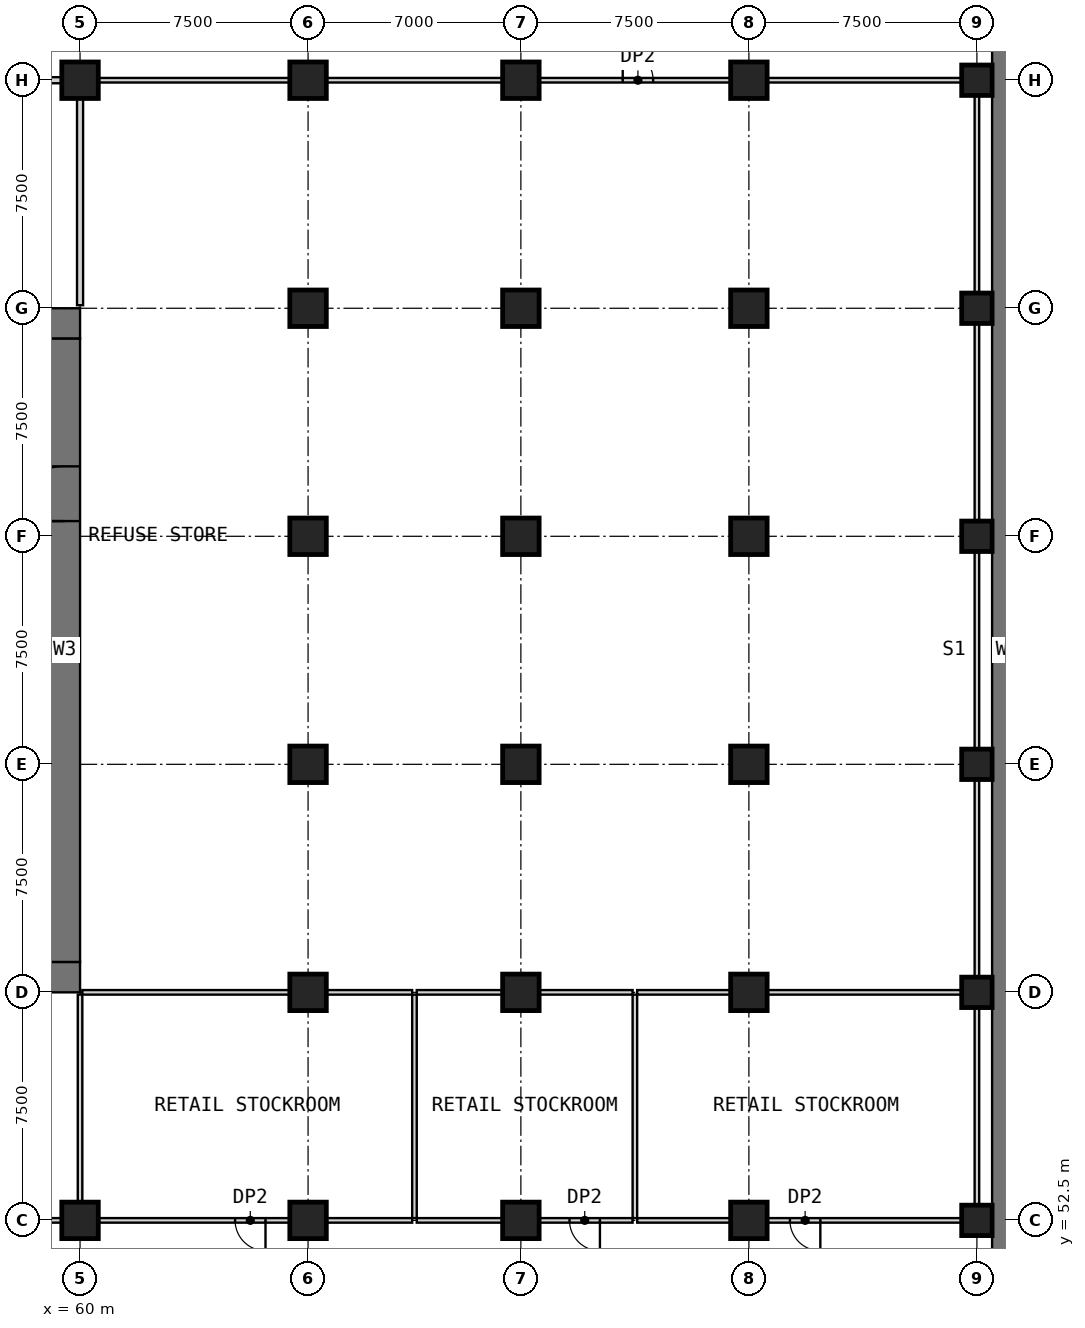
"""IFC4 building model, lengths in metres.
Left out: names, types, materials, properties, quantities, classifications, styles, units other than length and angle.
Written with IfcOpenShell. Run it as: python <this file> out.ifc"""

import sys

from ifc_helpers import new_model, si_unit, direction, frame, frame_2d, origin, origin_2d, place, context, subcontext, project, spatial, rectangle, extrude, element, fill, save


model = new_model("IFC4")
c1 = context("Model", 3, precision=1e-05, world=origin(), true_north=direction((0.0, 1.0)))
c2 = subcontext(c1, "Body", "Model", "MODEL_VIEW")
j1 = project(units=[si_unit("LENGTHUNIT", "METRE"), si_unit("PLANEANGLEUNIT", "RADIAN")], contexts=[c1])
p1 = place(None, origin())
s1 = spatial("IfcSite", under=j1, at=p1, CompositionType="ELEMENT")
p2 = place(p1, origin())
s2 = spatial("IfcBuilding", under=s1, at=p2, CompositionType="ELEMENT")
p3 = place(p2, frame((0.0, 0.0, -6.0)))
s3 = spatial("IfcBuildingStorey", under=s2, at=p3, CompositionType="ELEMENT", Elevation=-6.0)
p4 = place(p3, frame((90.5, 25.0, 0.0), z_axis=(0.0, 0.0, 1.0), x_axis=(0.0, 1.0, 0.0)))
e1 = element("IfcWall", 1, at=p4, inside=s3, PredefinedType="SHEAR", context=c2, shape_type="SweptSolid", body=[
    extrude(rectangle(XDim=92.5, YDim=1.0, at=frame_2d((46.25, 0.0))), origin(), (0.0, 0.0, 1.0), 4.8),
])
p5 = place(p4, frame((23.15, 0.0, 0.0)))
e2 = element("IfcOpeningElement", 2, at=p5, cuts=e1, PredefinedType="OPENING", context=c2, shape_type="SweptSolid", body=[
    extrude(rectangle(XDim=1.5, YDim=2.1, at=frame_2d((0.75, 1.05))), frame((0.0, 0.51, 0.0), z_axis=(0.0, -1.0, 0.0), x_axis=(1.0, 0.0, 0.0)), (0.0, 0.0, 1.0), 1.02),
])
p6 = place(p4, frame((67.75, 0.0, 0.0)))
e3 = element("IfcOpeningElement", 3, at=p6, cuts=e1, PredefinedType="OPENING", context=c2, shape_type="SweptSolid", body=[
    extrude(rectangle(XDim=1.5, YDim=2.1, at=frame_2d((0.75, 1.05))), frame((0.0, 0.51, 0.0), z_axis=(0.0, -1.0, 0.0), x_axis=(1.0, 0.0, 0.0)), (0.0, 0.0, 1.0), 1.02),
])
for number, where, z_axis, x_axis in (
    (4, (60.0, 52.5, 0.0), (0.0, 0.0, 1.0), (1.0, 0.0, 0.0)),
    (5, (60.0, 90.0, 0.0), (0.0, 0.0, 1.0), (1.0, 0.0, 0.0)),
    (6, (67.5, 52.5, 0.0), (0.0, 0.0, 1.0), (1.0, 0.0, 0.0)),
    (7, (67.5, 60.0, 0.0), (0.0, 0.0, 1.0), (1.0, 0.0, 0.0)),
    (8, (67.5, 67.5, 0.0), (0.0, 0.0, 1.0), (1.0, 0.0, 0.0)),
    (9, (67.5, 75.0, 0.0), (0.0, 0.0, 1.0), (1.0, 0.0, 0.0)),
    (10, (67.5, 82.5, 0.0), (0.0, 0.0, 1.0), (1.0, 0.0, 0.0)),
    (11, (67.5, 90.0, 0.0), (0.0, 0.0, 1.0), (1.0, 0.0, 0.0)),
    (12, (74.5, 52.5, 0.0), (0.0, 0.0, 1.0), (1.0, 0.0, 0.0)),
    (13, (74.5, 60.0, 0.0), (0.0, 0.0, 1.0), (1.0, 0.0, 0.0)),
    (14, (74.5, 67.5, 0.0), (0.0, 0.0, 1.0), (1.0, 0.0, 0.0)),
    (15, (74.5, 75.0, 0.0), (0.0, 0.0, 1.0), (1.0, 0.0, 0.0)),
    (16, (74.5, 82.5, 0.0), (0.0, 0.0, 1.0), (1.0, 0.0, 0.0)),
    (17, (74.5, 90.0, 0.0), (0.0, 0.0, 1.0), (1.0, 0.0, 0.0)),
    (18, (82.0, 52.5, 0.0), (0.0, 0.0, 1.0), (1.0, 0.0, 0.0)),
    (19, (82.0, 60.0, 0.0), (0.0, 0.0, 1.0), (1.0, 0.0, 0.0)),
    (20, (82.0, 67.5, 0.0), (0.0, 0.0, 1.0), (1.0, 0.0, 0.0)),
    (21, (82.0, 75.0, 0.0), (0.0, 0.0, 1.0), (1.0, 0.0, 0.0)),
    (22, (82.0, 82.5, 0.0), (0.0, 0.0, 1.0), (1.0, 0.0, 0.0)),
    (23, (82.0, 90.0, 0.0), (0.0, 0.0, 1.0), (1.0, 0.0, 0.0)),
):
    element("IfcColumn", number, at=place(p3, frame(where, z_axis=z_axis, x_axis=x_axis)), inside=s3, PredefinedType="COLUMN", context=c2, shape_type="SweptSolid", body=[
        extrude(rectangle(XDim=1.2, YDim=1.2, at=origin_2d()), origin(), (0.0, 0.0, 1.0), 6.0),
    ])
for number, where, z_axis, x_axis in (
    (24, (89.5, 52.5, 0.0), (0.0, 0.0, 1.0), (1.0, 0.0, 0.0)),
    (25, (89.5, 60.0, 0.0), (0.0, 0.0, 1.0), (1.0, 0.0, 0.0)),
    (26, (89.5, 67.5, 0.0), (0.0, 0.0, 1.0), (1.0, 0.0, 0.0)),
    (27, (89.5, 75.0, 0.0), (0.0, 0.0, 1.0), (1.0, 0.0, 0.0)),
    (28, (89.5, 82.5, 0.0), (0.0, 0.0, 1.0), (1.0, 0.0, 0.0)),
    (29, (89.5, 90.0, 0.0), (0.0, 0.0, 1.0), (1.0, 0.0, 0.0)),
):
    element("IfcColumn", number, at=place(p3, frame(where, z_axis=z_axis, x_axis=x_axis)), inside=s3, PredefinedType="COLUMN", context=c2, shape_type="SweptSolid", body=[
        extrude(rectangle(XDim=1.0, YDim=1.0, at=origin_2d()), origin(), (0.0, 0.0, 1.0), 6.0),
    ])
p7 = place(p3, frame((30.0, 60.5, 0.0), z_axis=(0.0, 0.0, 1.0), x_axis=(1.0, 0.0, 0.0)))
e30 = element("IfcWall", 30, at=p7, inside=s3, PredefinedType="SHEAR", context=c2, shape_type="SweptSolid", body=[
    extrude(rectangle(XDim=30.0, YDim=1.0, at=frame_2d((15.0, 0.0))), origin(), (0.0, 0.0, 1.0), 6.0),
])
p8 = place(p7, frame((21.9, 0.0, 0.0)))
e31 = element("IfcOpeningElement", 31, at=p8, cuts=e30, PredefinedType="OPENING", context=c2, shape_type="SweptSolid", body=[
    extrude(rectangle(XDim=1.8, YDim=2.1, at=frame_2d((0.9, 1.05))), frame((0.0, 0.51, 0.0), z_axis=(0.0, -1.0, 0.0), x_axis=(1.0, 0.0, 0.0)), (0.0, 0.0, 1.0), 1.02),
])
p9 = place(p7, frame((26.5, 0.0, 0.0)))
e32 = element("IfcOpeningElement", 32, at=p9, cuts=e30, PredefinedType="OPENING", context=c2, shape_type="SweptSolid", body=[
    extrude(rectangle(XDim=1.2, YDim=2.1, at=frame_2d((0.6, 1.05))), frame((0.0, 0.51, 0.0), z_axis=(0.0, -1.0, 0.0), x_axis=(1.0, 0.0, 0.0)), (0.0, 0.0, 1.0), 1.02),
])
p10 = place(p3, frame((30.0, 82.0, 0.0), z_axis=(0.0, 0.0, 1.0), x_axis=(1.0, 0.0, 0.0)))
e33 = element("IfcWall", 33, at=p10, inside=s3, PredefinedType="SHEAR", context=c2, shape_type="SweptSolid", body=[
    extrude(rectangle(XDim=30.0, YDim=1.0, at=frame_2d((15.0, 0.0))), origin(), (0.0, 0.0, 1.0), 6.0),
])
p11 = place(p3, frame((59.5, 61.0, 0.0), z_axis=(0.0, 0.0, 1.0), x_axis=(0.0, 1.0, 0.0)))
e34 = element("IfcWall", 34, at=p11, inside=s3, PredefinedType="SHEAR", context=c2, shape_type="SweptSolid", body=[
    extrude(rectangle(XDim=20.5, YDim=1.0, at=frame_2d((10.25, 0.0))), origin(), (0.0, 0.0, 1.0), 6.0),
])
p12 = place(p11, frame((14.5, 0.0, 0.0)))
e35 = element("IfcOpeningElement", 35, at=p12, cuts=e34, PredefinedType="OPENING", context=c2, shape_type="SweptSolid", body=[
    extrude(rectangle(XDim=1.8, YDim=2.1, at=frame_2d((0.9, 1.05))), frame((0.0, 0.51, 0.0), z_axis=(0.0, -1.0, 0.0), x_axis=(1.0, 0.0, 0.0)), (0.0, 0.0, 1.0), 1.02),
])
p13 = place(p3, frame((59.4, 52.5, 0.0), z_axis=(0.0, 0.0, 1.0), x_axis=(-1.0, 0.0, 0.0)))
e36 = element("IfcWall", 36, at=p13, inside=s3, PredefinedType="PARTITIONING", context=c2, shape_type="SweptSolid", body=[
    extrude(rectangle(XDim=6.3, YDim=0.15, at=frame_2d((3.15, 0.0))), origin(), (0.0, 0.0, 1.0), 5.7),
])
p14 = place(p13, frame((4.55, 0.0, 0.0)))
e37 = element("IfcOpeningElement", 37, at=p14, cuts=e36, PredefinedType="OPENING", context=c2, shape_type="SweptSolid", body=[
    extrude(rectangle(XDim=1.0, YDim=2.1, at=frame_2d((0.5, 1.05))), frame((0.0, 0.085, 0.0), z_axis=(0.0, -1.0, 0.0), x_axis=(1.0, 0.0, 0.0)), (0.0, 0.0, 1.0), 0.17),
])
p15 = place(p3, frame((66.9, 52.5, 0.0), z_axis=(0.0, 0.0, 1.0), x_axis=(-1.0, 0.0, 0.0)))
e38 = element("IfcWall", 38, at=p15, inside=s3, PredefinedType="PARTITIONING", context=c2, shape_type="SweptSolid", body=[
    extrude(rectangle(XDim=6.3, YDim=0.15, at=frame_2d((3.15, 0.0))), origin(), (0.0, 0.0, 1.0), 5.7),
])
p16 = place(p15, frame((0.8, 0.0, 0.0)))
e39 = element("IfcOpeningElement", 39, at=p16, cuts=e38, PredefinedType="OPENING", context=c2, shape_type="SweptSolid", body=[
    extrude(rectangle(XDim=1.0, YDim=2.1, at=frame_2d((0.5, 1.05))), frame((0.0, 0.085, 0.0), z_axis=(0.0, -1.0, 0.0), x_axis=(1.0, 0.0, 0.0)), (0.0, 0.0, 1.0), 0.17),
])
for number, where, z_axis, x_axis in (
    (40, (68.1, 52.5, 0.0), (0.0, 0.0, 1.0), (1.0, 0.0, 0.0)),
    (41, (71.075, 52.5, 0.0), (0.0, 0.0, 1.0), (1.0, 0.0, 0.0)),
):
    element("IfcWall", number, at=place(p3, frame(where, z_axis=z_axis, x_axis=x_axis)), inside=s3, PredefinedType="PARTITIONING", context=c2, shape_type="SweptSolid", body=[
        extrude(rectangle(XDim=2.825, YDim=0.15, at=frame_2d((1.413, 0.0))), origin(), (0.0, 0.0, 1.0), 5.7),
    ])
p17 = place(p3, frame((78.175, 52.5, 0.0), z_axis=(0.0, 0.0, 1.0), x_axis=(-1.0, 0.0, 0.0)))
e42 = element("IfcWall", 42, at=p17, inside=s3, PredefinedType="PARTITIONING", context=c2, shape_type="SweptSolid", body=[
    extrude(rectangle(XDim=3.075, YDim=0.15, at=frame_2d((1.538, 0.0))), origin(), (0.0, 0.0, 1.0), 5.7),
])
p18 = place(p17, frame((1.075, 0.0, 0.0)))
e43 = element("IfcOpeningElement", 43, at=p18, cuts=e42, PredefinedType="OPENING", context=c2, shape_type="SweptSolid", body=[
    extrude(rectangle(XDim=1.0, YDim=2.1, at=frame_2d((0.5, 1.05))), frame((0.0, 0.085, 0.0), z_axis=(0.0, -1.0, 0.0), x_axis=(1.0, 0.0, 0.0)), (0.0, 0.0, 1.0), 0.17),
])
p19 = place(p3, frame((78.325, 52.5, 0.0), z_axis=(0.0, 0.0, 1.0), x_axis=(1.0, 0.0, 0.0)))
e44 = element("IfcWall", 44, at=p19, inside=s3, PredefinedType="PARTITIONING", context=c2, shape_type="SweptSolid", body=[
    extrude(rectangle(XDim=3.075, YDim=0.15, at=frame_2d((1.538, 0.0))), origin(), (0.0, 0.0, 1.0), 5.7),
])
p20 = place(p3, frame((89.0, 52.5, 0.0), z_axis=(0.0, 0.0, 1.0), x_axis=(-1.0, 0.0, 0.0)))
e45 = element("IfcWall", 45, at=p20, inside=s3, PredefinedType="PARTITIONING", context=c2, shape_type="SweptSolid", body=[
    extrude(rectangle(XDim=6.4, YDim=0.15, at=frame_2d((3.2, 0.0))), origin(), (0.0, 0.0, 1.0), 5.7),
])
p21 = place(p20, frame((4.65, 0.0, 0.0)))
e46 = element("IfcOpeningElement", 46, at=p21, cuts=e45, PredefinedType="OPENING", context=c2, shape_type="SweptSolid", body=[
    extrude(rectangle(XDim=1.0, YDim=2.1, at=frame_2d((0.5, 1.05))), frame((0.0, 0.085, 0.0), z_axis=(0.0, -1.0, 0.0), x_axis=(1.0, 0.0, 0.0)), (0.0, 0.0, 1.0), 0.17),
])
p22 = place(p3, frame((53.1, 90.0, 0.0), z_axis=(0.0, 0.0, 1.0), x_axis=(1.0, 0.0, 0.0)))
e47 = element("IfcWall", 47, at=p22, inside=s3, PredefinedType="PARTITIONING", context=c2, shape_type="SweptSolid", body=[
    extrude(rectangle(XDim=6.3, YDim=0.2, at=frame_2d((3.15, 0.0))), origin(), (0.0, 0.0, 1.0), 5.7),
])
p23 = place(p3, frame((60.6, 90.0, 0.0), z_axis=(0.0, 0.0, 1.0), x_axis=(1.0, 0.0, 0.0)))
e48 = element("IfcWall", 48, at=p23, inside=s3, PredefinedType="PARTITIONING", context=c2, shape_type="SweptSolid", body=[
    extrude(rectangle(XDim=6.3, YDim=0.15, at=frame_2d((3.15, 0.0))), origin(), (0.0, 0.0, 1.0), 5.7),
])
p24 = place(p3, frame((68.1, 90.0, 0.0), z_axis=(0.0, 0.0, 1.0), x_axis=(1.0, 0.0, 0.0)))
e49 = element("IfcWall", 49, at=p24, inside=s3, PredefinedType="PARTITIONING", context=c2, shape_type="SweptSolid", body=[
    extrude(rectangle(XDim=5.8, YDim=0.15, at=frame_2d((2.9, 0.0))), origin(), (0.0, 0.0, 1.0), 5.7),
])
p25 = place(p3, frame((75.1, 90.0, 0.0), z_axis=(0.0, 0.0, 1.0), x_axis=(1.0, 0.0, 0.0)))
e50 = element("IfcWall", 50, at=p25, inside=s3, PredefinedType="PARTITIONING", context=c2, shape_type="SweptSolid", body=[
    extrude(rectangle(XDim=6.3, YDim=0.15, at=frame_2d((3.15, 0.0))), origin(), (0.0, 0.0, 1.0), 5.7),
])
p26 = place(p25, frame((2.75, 0.0, 0.0)))
e51 = element("IfcOpeningElement", 51, at=p26, cuts=e50, PredefinedType="OPENING", context=c2, shape_type="SweptSolid", body=[
    extrude(rectangle(XDim=1.0, YDim=2.1, at=frame_2d((0.5, 1.05))), frame((0.0, 0.085, 0.0), z_axis=(0.0, -1.0, 0.0), x_axis=(1.0, 0.0, 0.0)), (0.0, 0.0, 1.0), 0.17),
])
p27 = place(p3, frame((82.6, 90.0, 0.0), z_axis=(0.0, 0.0, 1.0), x_axis=(1.0, 0.0, 0.0)))
e52 = element("IfcWall", 52, at=p27, inside=s3, PredefinedType="PARTITIONING", context=c2, shape_type="SweptSolid", body=[
    extrude(rectangle(XDim=6.4, YDim=0.15, at=frame_2d((3.2, 0.0))), origin(), (0.0, 0.0, 1.0), 5.7),
])
p28 = place(p3, frame((60.075, 60.0, 0.0), z_axis=(0.0, 0.0, 1.0), x_axis=(1.0, 0.0, 0.0)))
e53 = element("IfcWall", 53, at=p28, inside=s3, PredefinedType="PARTITIONING", context=c2, shape_type="SweptSolid", body=[
    extrude(rectangle(XDim=6.825, YDim=0.15, at=frame_2d((3.413, 0.0))), origin(), (0.0, 0.0, 1.0), 5.7),
])
for number, where, z_axis, x_axis in (
    (54, (68.1, 60.0, 0.0), (0.0, 0.0, 1.0), (1.0, 0.0, 0.0)),
    (55, (71.075, 60.0, 0.0), (0.0, 0.0, 1.0), (1.0, 0.0, 0.0)),
):
    element("IfcWall", number, at=place(p3, frame(where, z_axis=z_axis, x_axis=x_axis)), inside=s3, PredefinedType="PARTITIONING", context=c2, shape_type="SweptSolid", body=[
        extrude(rectangle(XDim=2.825, YDim=0.15, at=frame_2d((1.413, 0.0))), origin(), (0.0, 0.0, 1.0), 5.7),
    ])
for number, where, z_axis, x_axis in (
    (56, (75.1, 60.0, 0.0), (0.0, 0.0, 1.0), (1.0, 0.0, 0.0)),
    (57, (78.325, 60.0, 0.0), (0.0, 0.0, 1.0), (1.0, 0.0, 0.0)),
):
    element("IfcWall", number, at=place(p3, frame(where, z_axis=z_axis, x_axis=x_axis)), inside=s3, PredefinedType="PARTITIONING", context=c2, shape_type="SweptSolid", body=[
        extrude(rectangle(XDim=3.075, YDim=0.15, at=frame_2d((1.538, 0.0))), origin(), (0.0, 0.0, 1.0), 5.7),
    ])
p29 = place(p3, frame((82.6, 60.0, 0.0), z_axis=(0.0, 0.0, 1.0), x_axis=(1.0, 0.0, 0.0)))
e58 = element("IfcWall", 58, at=p29, inside=s3, PredefinedType="PARTITIONING", context=c2, shape_type="SweptSolid", body=[
    extrude(rectangle(XDim=6.4, YDim=0.15, at=frame_2d((3.2, 0.0))), origin(), (0.0, 0.0, 1.0), 5.7),
])
for number, where, z_axis, x_axis in (
    (59, (89.5, 53.0, 0.0), (0.0, 0.0, 1.0), (0.0, 1.0, 0.0)),
    (60, (89.5, 60.5, 0.0), (0.0, 0.0, 1.0), (0.0, 1.0, 0.0)),
    (61, (89.5, 68.0, 0.0), (0.0, 0.0, 1.0), (0.0, 1.0, 0.0)),
    (62, (89.5, 75.5, 0.0), (0.0, 0.0, 1.0), (0.0, 1.0, 0.0)),
    (63, (89.5, 83.0, 0.0), (0.0, 0.0, 1.0), (0.0, 1.0, 0.0)),
):
    element("IfcWall", number, at=place(p3, frame(where, z_axis=z_axis, x_axis=x_axis)), inside=s3, PredefinedType="PARTITIONING", context=c2, shape_type="SweptSolid", body=[
        extrude(rectangle(XDim=6.5, YDim=0.15, at=frame_2d((3.25, 0.0))), origin(), (0.0, 0.0, 1.0), 5.7),
    ])
p30 = place(p3, frame((60.0, 53.1, 0.0), z_axis=(0.0, 0.0, 1.0), x_axis=(0.0, 1.0, 0.0)))
e64 = element("IfcWall", 64, at=p30, inside=s3, PredefinedType="PARTITIONING", context=c2, shape_type="SweptSolid", body=[
    extrude(rectangle(XDim=6.825, YDim=0.15, at=frame_2d((3.413, 0.0))), origin(), (0.0, 0.0, 1.0), 5.7),
])
p31 = place(p3, frame((60.0, 82.6, 0.0), z_axis=(0.0, 0.0, 1.0), x_axis=(0.0, 1.0, 0.0)))
e65 = element("IfcWall", 65, at=p31, inside=s3, PredefinedType="PARTITIONING", context=c2, shape_type="SweptSolid", body=[
    extrude(rectangle(XDim=6.8, YDim=0.2, at=frame_2d((3.4, 0.0))), origin(), (0.0, 0.0, 1.0), 5.7),
])
for number, where, z_axis, x_axis in (
    (66, (71.0, 52.575, 0.0), (0.0, 0.0, 1.0), (0.0, 1.0, 0.0)),
    (67, (78.25, 52.575, 0.0), (0.0, 0.0, 1.0), (0.0, 1.0, 0.0)),
):
    element("IfcWall", number, at=place(p3, frame(where, z_axis=z_axis, x_axis=x_axis)), inside=s3, PredefinedType="PARTITIONING", context=c2, shape_type="SweptSolid", body=[
        extrude(rectangle(XDim=7.35, YDim=0.15, at=frame_2d((3.675, 0.0))), origin(), (0.0, 0.0, 1.0), 5.7),
    ])
p32 = place(p12, origin())
e68 = element("IfcDoor", 68, at=p32, inside=s3, OperationType="DOUBLE_DOOR_SINGLE_SWING", PredefinedType="DOOR", context=c2, shape_type="SweptSolid", body=[
    extrude(rectangle(XDim=1.8, YDim=2.1, at=frame_2d((0.9, 1.05))), frame((0.0, 0.025, 0.0), z_axis=(0.0, -1.0, 0.0), x_axis=(1.0, 0.0, 0.0)), (0.0, 0.0, 1.0), 0.05),
])
fill(e35, e68)
p33 = place(p16, origin())
e69 = element("IfcDoor", 69, at=p33, inside=s3, OperationType="SINGLE_SWING_LEFT", PredefinedType="DOOR", context=c2, shape_type="SweptSolid", body=[
    extrude(rectangle(XDim=1.0, YDim=2.1, at=frame_2d((0.5, 1.05))), frame((0.0, 0.025, 0.0), z_axis=(0.0, -1.0, 0.0), x_axis=(1.0, 0.0, 0.0)), (0.0, 0.0, 1.0), 0.05),
])
fill(e39, e69)
p34 = place(p18, origin())
e70 = element("IfcDoor", 70, at=p34, inside=s3, OperationType="SINGLE_SWING_LEFT", PredefinedType="DOOR", context=c2, shape_type="SweptSolid", body=[
    extrude(rectangle(XDim=1.0, YDim=2.1, at=frame_2d((0.5, 1.05))), frame((0.0, 0.025, 0.0), z_axis=(0.0, -1.0, 0.0), x_axis=(1.0, 0.0, 0.0)), (0.0, 0.0, 1.0), 0.05),
])
fill(e43, e70)
p35 = place(p21, origin())
e71 = element("IfcDoor", 71, at=p35, inside=s3, OperationType="SINGLE_SWING_LEFT", PredefinedType="DOOR", context=c2, shape_type="SweptSolid", body=[
    extrude(rectangle(XDim=1.0, YDim=2.1, at=frame_2d((0.5, 1.05))), frame((0.0, 0.025, 0.0), z_axis=(0.0, -1.0, 0.0), x_axis=(1.0, 0.0, 0.0)), (0.0, 0.0, 1.0), 0.05),
])
fill(e46, e71)
p36 = place(p26, origin())
e72 = element("IfcDoor", 72, at=p36, inside=s3, OperationType="SINGLE_SWING_LEFT", PredefinedType="DOOR", context=c2, shape_type="SweptSolid", body=[
    extrude(rectangle(XDim=1.0, YDim=2.1, at=frame_2d((0.5, 1.05))), frame((0.0, 0.025, 0.0), z_axis=(0.0, -1.0, 0.0), x_axis=(1.0, 0.0, 0.0)), (0.0, 0.0, 1.0), 0.05),
])
fill(e51, e72)
save(model, sys.argv[1])
